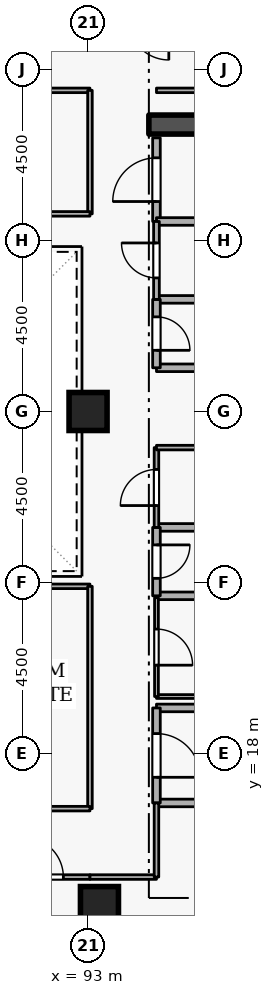
"""IFC4 building model, lengths in metres.
Left out: names, types, materials, properties, quantities, classifications, styles, units other than length and angle.
Written with IfcOpenShell. Run it as: python <this file> out.ifc"""

import sys

from ifc_helpers import new_model, si_unit, direction, frame, frame_2d, origin, origin_2d, place, context, subcontext, project, spatial, rectangle, extrude, element, fill, save


model = new_model("IFC4")
c1 = context("Model", 3, precision=1e-05, world=origin(), true_north=direction((0.0, 1.0)))
c2 = subcontext(c1, "Body", "Model", "MODEL_VIEW")
j1 = project(units=[si_unit("LENGTHUNIT", "METRE"), si_unit("PLANEANGLEUNIT", "RADIAN")], contexts=[c1])
p1 = place(None, origin())
s1 = spatial("IfcSite", under=j1, at=p1, CompositionType="ELEMENT")
p2 = place(p1, origin())
s2 = spatial("IfcBuilding", under=s1, at=p2, CompositionType="ELEMENT")
p3 = place(p2, frame((0.0, 0.0, 233.1)))
s3 = spatial("IfcBuildingStorey", under=s2, at=p3, CompositionType="ELEMENT", Elevation=233.1)
p4 = place(p3, frame((94.6, 34.55, 0.0), z_axis=(0.0, 0.0, 1.0), x_axis=(1.0, 0.0, 0.0)))
e1 = element("IfcWall", 1, at=p4, inside=s3, PredefinedType="SHEAR", context=c2, shape_type="SweptSolid", body=[
    extrude(rectangle(XDim=5.8, YDim=0.5, at=frame_2d((2.9, 0.0))), origin(), (0.0, 0.0, 1.0), 3.6),
])
for number, where, z_axis, x_axis in (
    (2, (93.3, 14.0, 0.0), (0.0, 0.0, 1.0), (1.0, 0.0, 0.0)),
    (3, (93.0, 27.0, 0.0), (0.0, 0.0, 1.0), (1.0, 0.0, 0.0)),
):
    element("IfcColumn", number, at=place(p3, frame(where, z_axis=z_axis, x_axis=x_axis)), inside=s3, PredefinedType="COLUMN", context=c2, shape_type="SweptSolid", body=[
        extrude(rectangle(XDim=1.0, YDim=1.0, at=origin_2d()), origin(), (0.0, 0.0, 1.0), 3.6),
    ])
p5 = place(p3, frame((94.8, 16.7, 0.0), z_axis=(0.0, 0.0, 1.0), x_axis=(1.0, 0.0, 0.0)))
e4 = element("IfcWall", 4, at=p5, inside=s3, PredefinedType="STANDARD", context=c2, shape_type="SweptSolid", body=[
    extrude(rectangle(XDim=5.7, YDim=0.2, at=frame_2d((2.85, 0.0))), origin(), (0.0, 0.0, 1.0), 3.34),
])
p6 = place(p3, frame((97.1, 19.2, 0.0), z_axis=(0.0, 0.0, 1.0), x_axis=(-1.0, 0.0, 0.0)))
e5 = element("IfcWall", 5, at=p6, inside=s3, PredefinedType="STANDARD", context=c2, shape_type="SweptSolid", body=[
    extrude(rectangle(XDim=2.3, YDim=0.2, at=frame_2d((1.15, 0.0))), origin(), (0.0, 0.0, 1.0), 2.545),
])
p7 = place(p3, frame((94.8, 19.2, 0.0), z_axis=(0.0, 0.0, 1.0), x_axis=(0.0, -1.0, 0.0)))
e6 = element("IfcWall", 6, at=p7, inside=s3, PredefinedType="STANDARD", context=c2, shape_type="SweptSolid", body=[
    extrude(rectangle(XDim=2.5, YDim=0.2, at=frame_2d((1.25, 0.0))), origin(), (0.0, 0.0, 1.0), 3.34),
])
p8 = place(p7, frame((0.675, 0.0, 0.0)))
e7 = element("IfcOpeningElement", 7, at=p8, cuts=e6, PredefinedType="OPENING", context=c2, shape_type="SweptSolid", body=[
    extrude(rectangle(XDim=1.15, YDim=2.1, at=frame_2d((0.575, 1.05))), frame((0.0, 0.11, 0.0), z_axis=(0.0, -1.0, 0.0), x_axis=(1.0, 0.0, 0.0)), (0.0, 0.0, 1.0), 0.22),
])
for number, where, z_axis, x_axis in (
    (8, (94.8, 28.15, 0.0), (0.0, 0.0, 1.0), (1.0, 0.0, 0.0)),
    (9, (96.85, 29.95, 0.0), (0.0, 0.0, 1.0), (-1.0, 0.0, 0.0)),
):
    element("IfcWall", number, at=place(p3, frame(where, z_axis=z_axis, x_axis=x_axis)), inside=s3, PredefinedType="STANDARD", context=c2, shape_type="SweptSolid", body=[
        extrude(rectangle(XDim=2.05, YDim=0.2, at=frame_2d((1.025, 0.0))), origin(), (0.0, 0.0, 1.0), 3.34),
    ])
p9 = place(p3, frame((94.8, 29.95, 0.0), z_axis=(0.0, 0.0, 1.0), x_axis=(0.0, -1.0, 0.0)))
e10 = element("IfcWall", 10, at=p9, inside=s3, PredefinedType="STANDARD", context=c2, shape_type="SweptSolid", body=[
    extrude(rectangle(XDim=1.8, YDim=0.2, at=frame_2d((0.9, 0.0))), origin(), (0.0, 0.0, 1.0), 3.34),
])
p10 = place(p9, frame((0.46, 0.0, 0.0)))
e11 = element("IfcOpeningElement", 11, at=p10, cuts=e10, PredefinedType="OPENING", context=c2, shape_type="SweptSolid", body=[
    extrude(rectangle(XDim=0.88, YDim=2.04, at=frame_2d((0.44, 1.02))), frame((0.0, 0.11, 0.0), z_axis=(0.0, -1.0, 0.0), x_axis=(1.0, 0.0, 0.0)), (0.0, 0.0, 1.0), 0.22),
])
for number, where, z_axis, x_axis in (
    (12, (94.8, 22.15, 0.0), (0.0, 0.0, 1.0), (1.0, 0.0, 0.0)),
    (13, (96.85, 23.95, 0.0), (0.0, 0.0, 1.0), (-1.0, 0.0, 0.0)),
):
    element("IfcWall", number, at=place(p3, frame(where, z_axis=z_axis, x_axis=x_axis)), inside=s3, PredefinedType="STANDARD", context=c2, shape_type="SweptSolid", body=[
        extrude(rectangle(XDim=2.05, YDim=0.2, at=frame_2d((1.025, 0.0))), origin(), (0.0, 0.0, 1.0), 3.34),
    ])
p11 = place(p3, frame((94.8, 23.95, 0.0), z_axis=(0.0, 0.0, 1.0), x_axis=(0.0, -1.0, 0.0)))
e14 = element("IfcWall", 14, at=p11, inside=s3, PredefinedType="STANDARD", context=c2, shape_type="SweptSolid", body=[
    extrude(rectangle(XDim=1.8, YDim=0.2, at=frame_2d((0.9, 0.0))), origin(), (0.0, 0.0, 1.0), 3.34),
])
p12 = place(p11, frame((0.46, 0.0, 0.0)))
e15 = element("IfcOpeningElement", 15, at=p12, cuts=e14, PredefinedType="OPENING", context=c2, shape_type="SweptSolid", body=[
    extrude(rectangle(XDim=0.88, YDim=2.04, at=frame_2d((0.44, 1.02))), frame((0.0, 0.11, 0.0), z_axis=(0.0, -1.0, 0.0), x_axis=(1.0, 0.0, 0.0)), (0.0, 0.0, 1.0), 0.22),
])
p13 = place(p3, frame((94.8, 32.0, 0.0), z_axis=(0.0, 0.0, 1.0), x_axis=(0.0, 1.0, 0.0)))
e16 = element("IfcWall", 16, at=p13, inside=s3, PredefinedType="STANDARD", context=c2, shape_type="SweptSolid", body=[
    extrude(rectangle(XDim=2.2, YDim=0.2, at=frame_2d((1.1, 0.0))), origin(), (0.0, 0.0, 1.0), 3.34),
])
p14 = place(p13, frame((0.525, 0.0, 0.0)))
e17 = element("IfcOpeningElement", 17, at=p14, cuts=e16, PredefinedType="OPENING", context=c2, shape_type="SweptSolid", body=[
    extrude(rectangle(XDim=1.15, YDim=2.1, at=frame_2d((0.575, 1.05))), frame((0.0, 0.11, 0.0), z_axis=(0.0, -1.0, 0.0), x_axis=(1.0, 0.0, 0.0)), (0.0, 0.0, 1.0), 0.22),
])
p15 = place(p3, frame((96.85, 32.0, 0.0), z_axis=(0.0, 0.0, 1.0), x_axis=(-1.0, 0.0, 0.0)))
e18 = element("IfcWall", 18, at=p15, inside=s3, PredefinedType="STANDARD", context=c2, shape_type="SweptSolid", body=[
    extrude(rectangle(XDim=2.05, YDim=0.2, at=frame_2d((1.025, 0.0))), origin(), (0.0, 0.0, 1.0), 3.34),
])
p16 = place(p3, frame((94.8, 19.5, 0.0), z_axis=(0.0, 0.0, 1.0), x_axis=(1.0, 0.0, 0.0)))
e19 = element("IfcWall", 19, at=p16, inside=s3, PredefinedType="PARTITIONING", context=c2, shape_type="SweptSolid", body=[
    extrude(rectangle(XDim=2.05, YDim=0.1, at=frame_2d((1.025, 0.0))), origin(), (0.0, 0.0, 1.0), 2.545),
])
p17 = place(p3, frame((94.8, 22.1, 0.0), z_axis=(0.0, 0.0, 1.0), x_axis=(0.0, -1.0, 0.0)))
e20 = element("IfcWall", 20, at=p17, inside=s3, PredefinedType="PARTITIONING", context=c2, shape_type="SweptSolid", body=[
    extrude(rectangle(XDim=2.6, YDim=0.1, at=frame_2d((1.3, 0.0))), origin(), (0.0, 0.0, 1.0), 3.34),
])
p18 = place(p17, frame((0.825, 0.0, 0.0)))
e21 = element("IfcOpeningElement", 21, at=p18, cuts=e20, PredefinedType="OPENING", context=c2, shape_type="SweptSolid", body=[
    extrude(rectangle(XDim=0.95, YDim=2.1, at=frame_2d((0.475, 1.05))), frame((0.0, 0.06, 0.0), z_axis=(0.0, -1.0, 0.0), x_axis=(1.0, 0.0, 0.0)), (0.0, 0.0, 1.0), 0.12),
])
p19 = place(p3, frame((94.8, 23.95, 0.0), z_axis=(0.0, 0.0, 1.0), x_axis=(0.0, 1.0, 0.0)))
e22 = element("IfcWall", 22, at=p19, inside=s3, PredefinedType="PARTITIONING", context=c2, shape_type="SweptSolid", body=[
    extrude(rectangle(XDim=2.1, YDim=0.12, at=frame_2d((1.05, 0.0))), origin(), (0.0, 0.0, 1.0), 3.34),
])
p20 = place(p19, frame((0.575, 0.0, 0.0)))
e23 = element("IfcOpeningElement", 23, at=p20, cuts=e22, PredefinedType="OPENING", context=c2, shape_type="SweptSolid", body=[
    extrude(rectangle(XDim=0.95, YDim=2.1, at=frame_2d((0.475, 1.05))), frame((0.0, 0.07, 0.0), z_axis=(0.0, -1.0, 0.0), x_axis=(1.0, 0.0, 0.0)), (0.0, 0.0, 1.0), 0.14),
])
p21 = place(p3, frame((94.8, 26.05, 0.0), z_axis=(0.0, 0.0, 1.0), x_axis=(1.0, 0.0, 0.0)))
e24 = element("IfcWall", 24, at=p21, inside=s3, PredefinedType="PARTITIONING", context=c2, shape_type="SweptSolid", body=[
    extrude(rectangle(XDim=2.05, YDim=0.12, at=frame_2d((1.025, 0.0))), origin(), (0.0, 0.0, 1.0), 3.34),
])
p22 = place(p3, frame((94.8, 29.95, 0.0), z_axis=(0.0, 0.0, 1.0), x_axis=(0.0, 1.0, 0.0)))
e25 = element("IfcWall", 25, at=p22, inside=s3, PredefinedType="PARTITIONING", context=c2, shape_type="SweptSolid", body=[
    extrude(rectangle(XDim=2.05, YDim=0.15, at=frame_2d((1.025, 0.0))), origin(), (0.0, 0.0, 1.0), 3.34),
])
p23 = place(p22, frame((0.565, 0.0, 0.0)))
e26 = element("IfcOpeningElement", 26, at=p23, cuts=e25, PredefinedType="OPENING", context=c2, shape_type="SweptSolid", body=[
    extrude(rectangle(XDim=0.92, YDim=2.08, at=frame_2d((0.46, 1.04))), frame((0.0, 0.085, 0.0), z_axis=(0.0, -1.0, 0.0), x_axis=(1.0, 0.0, 0.0)), (0.0, 0.0, 1.0), 0.17),
])
p24 = place(p3, frame((94.8, 35.45, 0.0), z_axis=(0.0, 0.0, 1.0), x_axis=(1.0, 0.0, 0.0)))
e27 = element("IfcWall", 27, at=p24, inside=s3, PredefinedType="PARTITIONING", context=c2, shape_type="SweptSolid", body=[
    extrude(rectangle(XDim=5.9, YDim=0.12, at=frame_2d((2.95, 0.0))), origin(), (0.0, 0.0, 1.0), 3.34),
])
p25 = place(p3, frame((90.6, 14.75, 0.0), z_axis=(0.0, 0.0, 1.0), x_axis=(1.0, 0.0, 0.0)))
e28 = element("IfcWall", 28, at=p25, inside=s3, PredefinedType="PARTITIONING", context=c2, shape_type="SweptSolid", body=[
    extrude(rectangle(XDim=2.45, YDim=0.12, at=frame_2d((1.225, 0.0))), origin(), (0.0, 0.0, 1.0), 3.34),
])
p26 = place(p25, frame((0.7, 0.0, 0.0)))
e29 = element("IfcOpeningElement", 29, at=p26, cuts=e28, PredefinedType="OPENING", context=c2, shape_type="SweptSolid", body=[
    extrude(rectangle(XDim=1.05, YDim=2.1, at=frame_2d((0.525, 1.05))), frame((0.0, 0.07, 0.0), z_axis=(0.0, -1.0, 0.0), x_axis=(1.0, 0.0, 0.0)), (0.0, 0.0, 1.0), 0.14),
])
p27 = place(p3, frame((93.05, 14.75, 0.0), z_axis=(0.0, 0.0, 1.0), x_axis=(1.0, 0.0, 0.0)))
e30 = element("IfcWall", 30, at=p27, inside=s3, PredefinedType="PARTITIONING", context=c2, shape_type="SweptSolid", body=[
    extrude(rectangle(XDim=1.75, YDim=0.12, at=frame_2d((0.875, 0.0))), origin(), (0.0, 0.0, 1.0), 3.34),
])
p28 = place(p3, frame((94.8, 14.75, 0.0), z_axis=(0.0, 0.0, 1.0), x_axis=(0.0, 1.0, 0.0)))
e31 = element("IfcWall", 31, at=p28, inside=s3, PredefinedType="PARTITIONING", context=c2, shape_type="SweptSolid", body=[
    extrude(rectangle(XDim=1.95, YDim=0.12, at=frame_2d((0.975, 0.0))), origin(), (0.0, 0.0, 1.0), 3.34),
])
p29 = place(p3, frame((83.95, 22.4, 0.0), z_axis=(0.0, 0.0, 1.0), x_axis=(1.0, 0.0, 0.0)))
e32 = element("IfcWall", 32, at=p29, inside=s3, PredefinedType="PARTITIONING", context=c2, shape_type="SweptSolid", body=[
    extrude(rectangle(XDim=9.1, YDim=0.12, at=frame_2d((4.55, 0.0))), origin(), (0.0, 0.0, 1.0), 3.34),
])
p30 = place(p3, frame((93.05, 22.4, 0.0), z_axis=(0.0, 0.0, 1.0), x_axis=(0.0, -1.0, 0.0)))
e33 = element("IfcWall", 33, at=p30, inside=s3, PredefinedType="PARTITIONING", context=c2, shape_type="SweptSolid", body=[
    extrude(rectangle(XDim=5.85, YDim=0.12, at=frame_2d((2.925, 0.0))), origin(), (0.0, 0.0, 1.0), 3.34),
])
p31 = place(p3, frame((93.05, 16.55, 0.0), z_axis=(0.0, 0.0, 1.0), x_axis=(-1.0, 0.0, 0.0)))
e34 = element("IfcWall", 34, at=p31, inside=s3, PredefinedType="PARTITIONING", context=c2, shape_type="SweptSolid", body=[
    extrude(rectangle(XDim=9.1, YDim=0.12, at=frame_2d((4.55, 0.0))), origin(), (0.0, 0.0, 1.0), 3.34),
])
p32 = place(p31, frame((4.075, 0.0, 0.0)))
e35 = element("IfcOpeningElement", 35, at=p32, cuts=e34, PredefinedType="OPENING", context=c2, shape_type="SweptSolid", body=[
    extrude(rectangle(XDim=0.95, YDim=2.1, at=frame_2d((0.475, 1.05))), frame((0.0, 0.07, 0.0), z_axis=(0.0, -1.0, 0.0), x_axis=(1.0, 0.0, 0.0)), (0.0, 0.0, 1.0), 0.14),
])
p33 = place(p3, frame((83.95, 35.45, 0.0), z_axis=(0.0, 0.0, 1.0), x_axis=(1.0, 0.0, 0.0)))
e36 = element("IfcWall", 36, at=p33, inside=s3, PredefinedType="PARTITIONING", context=c2, shape_type="SweptSolid", body=[
    extrude(rectangle(XDim=9.1, YDim=0.12, at=frame_2d((4.55, 0.0))), origin(), (0.0, 0.0, 1.0), 3.34),
])
p34 = place(p33, frame((4.075, 0.0, 0.0)))
e37 = element("IfcOpeningElement", 37, at=p34, cuts=e36, PredefinedType="OPENING", context=c2, shape_type="SweptSolid", body=[
    extrude(rectangle(XDim=0.95, YDim=2.1, at=frame_2d((0.475, 1.05))), frame((0.0, 0.07, 0.0), z_axis=(0.0, -1.0, 0.0), x_axis=(1.0, 0.0, 0.0)), (0.0, 0.0, 1.0), 0.14),
])
p35 = place(p3, frame((93.05, 35.45, 0.0), z_axis=(0.0, 0.0, 1.0), x_axis=(0.0, -1.0, 0.0)))
e38 = element("IfcWall", 38, at=p35, inside=s3, PredefinedType="PARTITIONING", context=c2, shape_type="SweptSolid", body=[
    extrude(rectangle(XDim=3.25, YDim=0.12, at=frame_2d((1.625, 0.0))), origin(), (0.0, 0.0, 1.0), 3.34),
])
p36 = place(p3, frame((93.05, 32.2, 0.0), z_axis=(0.0, 0.0, 1.0), x_axis=(-1.0, 0.0, 0.0)))
e39 = element("IfcWall", 39, at=p36, inside=s3, PredefinedType="PARTITIONING", context=c2, shape_type="SweptSolid", body=[
    extrude(rectangle(XDim=9.1, YDim=0.12, at=frame_2d((4.55, 0.0))), origin(), (0.0, 0.0, 1.0), 3.34),
])
p37 = place(p8, origin())
e40 = element("IfcDoor", 40, at=p37, inside=s3, OperationType="SINGLE_SWING_RIGHT", PredefinedType="DOOR", context=c2, shape_type="SweptSolid", body=[
    extrude(rectangle(XDim=1.15, YDim=2.1, at=frame_2d((0.575, 1.05))), frame((0.0, 0.025, 0.0), z_axis=(0.0, -1.0, 0.0), x_axis=(1.0, 0.0, 0.0)), (0.0, 0.0, 1.0), 0.05),
])
fill(e7, e40)
p38 = place(p10, origin())
e41 = element("IfcDoor", 41, at=p38, inside=s3, OperationType="SINGLE_SWING_RIGHT", PredefinedType="DOOR", context=c2, shape_type="SweptSolid", body=[
    extrude(rectangle(XDim=0.88, YDim=2.04, at=frame_2d((0.44, 1.02))), frame((0.0, 0.025, 0.0), z_axis=(0.0, -1.0, 0.0), x_axis=(1.0, 0.0, 0.0)), (0.0, 0.0, 1.0), 0.05),
])
fill(e11, e41)
p39 = place(p12, origin())
e42 = element("IfcDoor", 42, at=p39, inside=s3, OperationType="SINGLE_SWING_LEFT", PredefinedType="DOOR", context=c2, shape_type="SweptSolid", body=[
    extrude(rectangle(XDim=0.88, YDim=2.04, at=frame_2d((0.44, 1.02))), frame((0.0, 0.025, 0.0), z_axis=(0.0, -1.0, 0.0), x_axis=(1.0, 0.0, 0.0)), (0.0, 0.0, 1.0), 0.05),
])
fill(e15, e42)
p40 = place(p18, origin())
e43 = element("IfcDoor", 43, at=p40, inside=s3, OperationType="SINGLE_SWING_RIGHT", PredefinedType="DOOR", context=c2, shape_type="SweptSolid", body=[
    extrude(rectangle(XDim=0.95, YDim=2.1, at=frame_2d((0.475, 1.05))), frame((0.0, 0.025, 0.0), z_axis=(0.0, -1.0, 0.0), x_axis=(1.0, 0.0, 0.0)), (0.0, 0.0, 1.0), 0.05),
])
fill(e21, e43)
p41 = place(p20, origin())
e44 = element("IfcDoor", 44, at=p41, inside=s3, OperationType="SINGLE_SWING_LEFT", PredefinedType="DOOR", context=c2, shape_type="SweptSolid", body=[
    extrude(rectangle(XDim=0.95, YDim=2.1, at=frame_2d((0.475, 1.05))), frame((0.0, 0.025, 0.0), z_axis=(0.0, -1.0, 0.0), x_axis=(1.0, 0.0, 0.0)), (0.0, 0.0, 1.0), 0.05),
])
fill(e23, e44)
p42 = place(p23, origin())
e45 = element("IfcDoor", 45, at=p42, inside=s3, OperationType="SINGLE_SWING_RIGHT", PredefinedType="DOOR", context=c2, shape_type="SweptSolid", body=[
    extrude(rectangle(XDim=0.92, YDim=2.08, at=frame_2d((0.46, 1.04))), frame((0.0, 0.025, 0.0), z_axis=(0.0, -1.0, 0.0), x_axis=(1.0, 0.0, 0.0)), (0.0, 0.0, 1.0), 0.05),
])
fill(e26, e45)
p43 = place(p14, origin())
e46 = element("IfcDoor", 46, at=p43, inside=s3, OperationType="SINGLE_SWING_LEFT", PredefinedType="DOOR", context=c2, shape_type="SweptSolid", body=[
    extrude(rectangle(XDim=1.15, YDim=2.1, at=frame_2d((0.575, 1.05))), frame((0.0, 0.025, 0.0), z_axis=(0.0, -1.0, 0.0), x_axis=(1.0, 0.0, 0.0)), (0.0, 0.0, 1.0), 0.05),
])
fill(e17, e46)
p44 = place(p26, origin())
e47 = element("IfcDoor", 47, at=p44, inside=s3, OperationType="SINGLE_SWING_LEFT", PredefinedType="DOOR", context=c2, shape_type="SweptSolid", body=[
    extrude(rectangle(XDim=1.05, YDim=2.1, at=frame_2d((0.525, 1.05))), frame((0.0, 0.025, 0.0), z_axis=(0.0, -1.0, 0.0), x_axis=(1.0, 0.0, 0.0)), (0.0, 0.0, 1.0), 0.05),
])
fill(e29, e47)
save(model, sys.argv[1])
